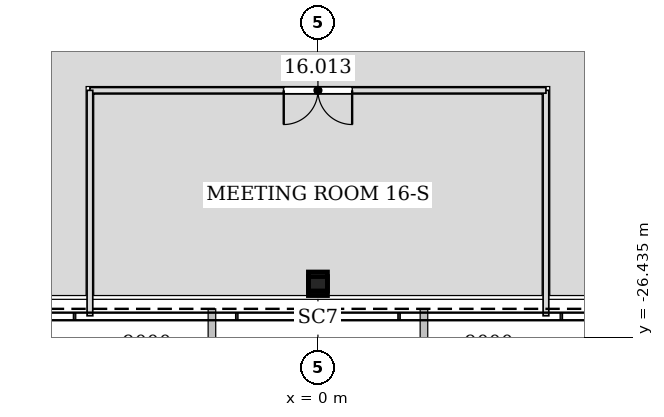
"""IFC4 building model, lengths in metres.
Left out: names, types, materials, properties, quantities, classifications, styles, units other than length and angle.
Written with IfcOpenShell. Run it as: python <this file> out.ifc"""

import sys

from ifc_helpers import new_model, si_unit, direction, frame, frame_2d, origin, origin_2d, place, context, subcontext, project, spatial, rectangle, hollow_rectangle, extrude, element, fill, save


model = new_model("IFC4")
c1 = context("Model", 3, precision=1e-05, world=origin(), true_north=direction((0.0, 1.0)))
c2 = subcontext(c1, "Body", "Model", "MODEL_VIEW")
j1 = project(units=[si_unit("LENGTHUNIT", "METRE"), si_unit("PLANEANGLEUNIT", "RADIAN")], contexts=[c1])
p1 = place(None, origin())
s1 = spatial("IfcSite", under=j1, at=p1, CompositionType="ELEMENT")
p2 = place(p1, origin())
s2 = spatial("IfcBuilding", under=s1, at=p2, CompositionType="ELEMENT")
p3 = place(p2, frame((0.0, 0.0, 75.0)))
s3 = spatial("IfcBuildingStorey", under=s2, at=p3, CompositionType="ELEMENT", Elevation=75.0)
p4 = place(p3, frame((0.0, -25.093, 0.0), z_axis=(0.0, 0.028239619523, 0.999601182417), x_axis=(-1.0, 0.0, 0.0)))
e1 = element("IfcColumn", 1, at=p4, inside=s3, PredefinedType="COLUMN", context=c2, shape_type="SweptSolid", body=[
    extrude(hollow_rectangle(XDim=0.5, YDim=0.5, WallThickness=0.025, at=origin_2d()), origin(), (0.0, 0.0, 1.0), 4.202),
])
p5 = place(p3, frame((6.0, -25.875, 0.0), z_axis=(0.0, 0.0, 1.0), x_axis=(0.0, 1.0, 0.0)))
e2 = element("IfcWall", 2, at=p5, inside=s3, PredefinedType="PARTITIONING", context=c2, shape_type="SweptSolid", body=[
    extrude(rectangle(XDim=5.932, YDim=0.15, at=frame_2d((2.966, 0.0))), origin(), (0.0, 0.0, 1.0), 3.423),
])
p6 = place(p3, frame((6.0, -19.943, 0.0), z_axis=(0.0, 0.0, 1.0), x_axis=(-1.0, 0.0, 0.0)))
e3 = element("IfcWall", 3, at=p6, inside=s3, PredefinedType="PARTITIONING", context=c2, shape_type="SweptSolid", body=[
    extrude(rectangle(XDim=12.0, YDim=0.15, at=frame_2d((6.0, 0.0))), origin(), (0.0, 0.0, 1.0), 3.065),
])
p7 = place(p6, frame((5.1, 0.0, 0.0)))
e4 = element("IfcOpeningElement", 4, at=p7, cuts=e3, PredefinedType="OPENING", context=c2, shape_type="SweptSolid", body=[
    extrude(rectangle(XDim=1.8, YDim=2.4, at=frame_2d((0.9, 1.2))), frame((0.0, 0.085, 0.0), z_axis=(0.0, -1.0, 0.0), x_axis=(1.0, 0.0, 0.0)), (0.0, 0.0, 1.0), 0.17),
])
p8 = place(p3, frame((-6.0, -19.943, 0.0), z_axis=(0.0, 0.0, 1.0), x_axis=(0.0, -1.0, 0.0)))
e5 = element("IfcWall", 5, at=p8, inside=s3, PredefinedType="PARTITIONING", context=c2, shape_type="SweptSolid", body=[
    extrude(rectangle(XDim=5.932, YDim=0.15, at=frame_2d((2.966, 0.0))), origin(), (0.0, 0.0, 1.0), 3.423),
])
p9 = place(p7, origin())
e6 = element("IfcDoor", 6, at=p9, inside=s3, OperationType="DOUBLE_DOOR_SINGLE_SWING", PredefinedType="DOOR", context=c2, shape_type="SweptSolid", body=[
    extrude(rectangle(XDim=1.8, YDim=2.4, at=frame_2d((0.9, 1.2))), frame((0.0, 0.025, 0.0), z_axis=(0.0, -1.0, 0.0), x_axis=(1.0, 0.0, 0.0)), (0.0, 0.0, 1.0), 0.05),
])
fill(e4, e6)
save(model, sys.argv[1])
